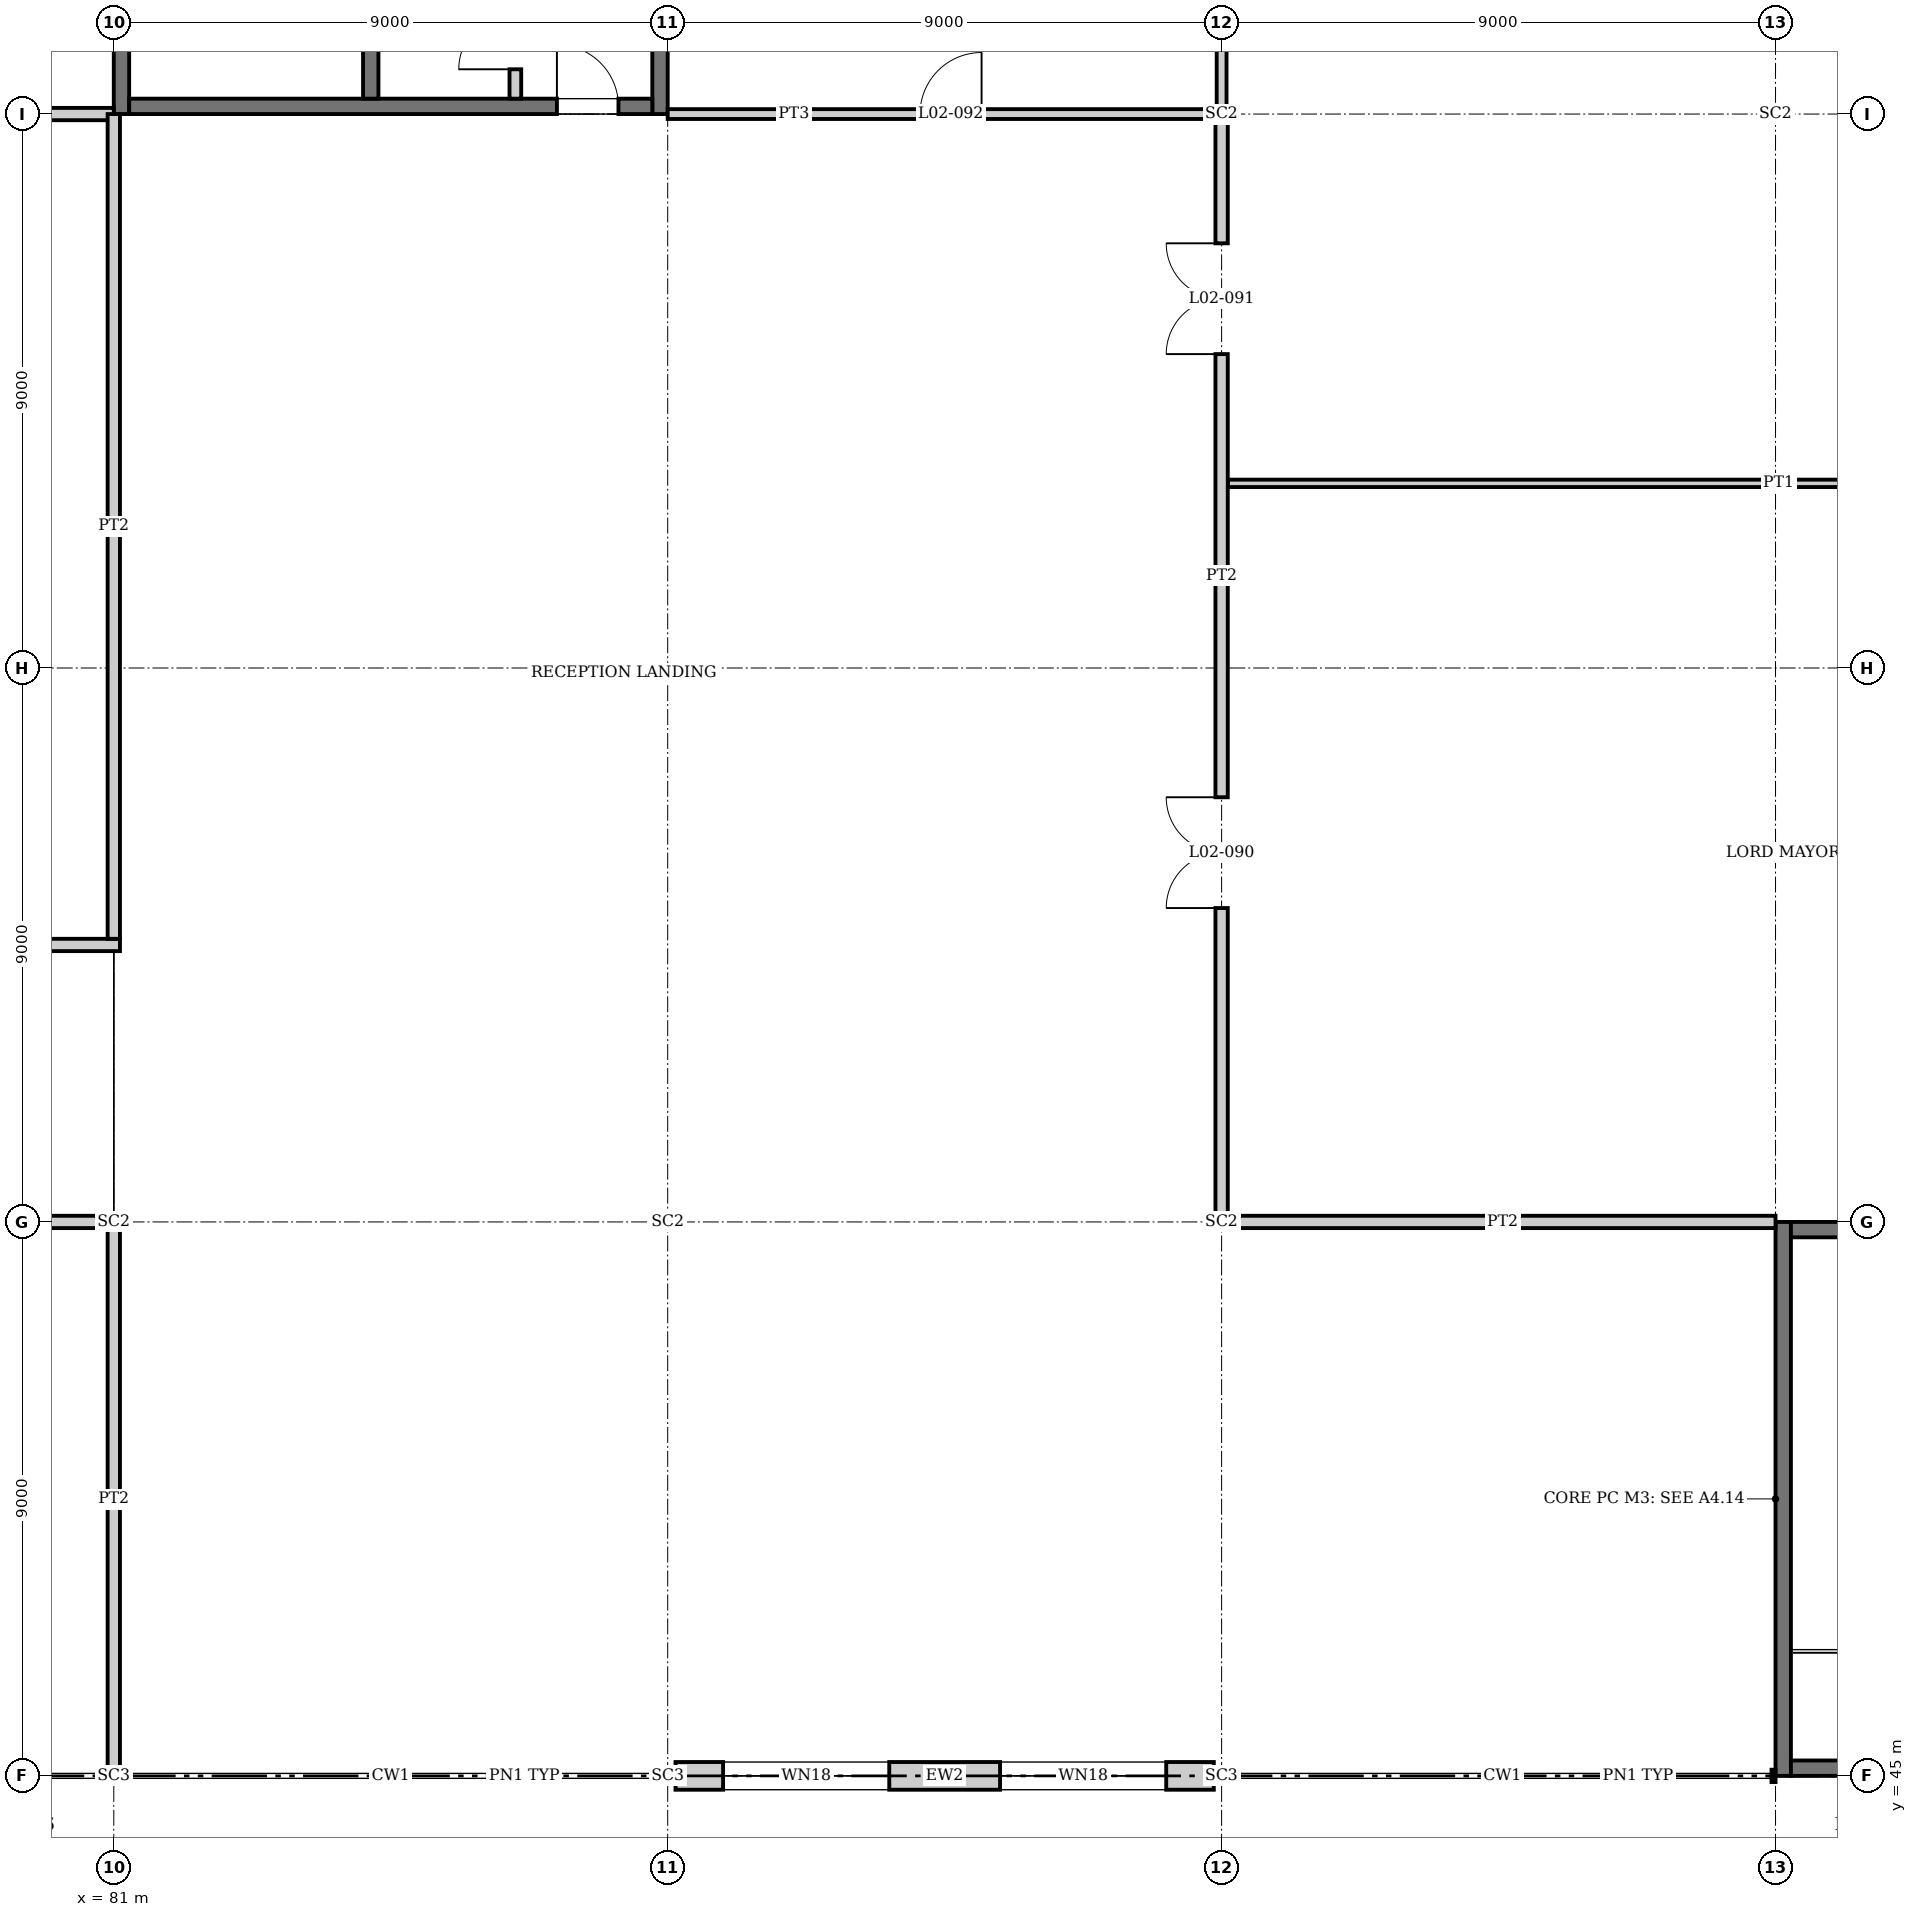
"""IFC4 building model, lengths in metres.
Left out: names, types, materials, properties, quantities, classifications, styles, units other than length and angle.
Written with IfcOpenShell. Run it as: python <this file> out.ifc"""

import sys

from ifc_helpers import new_model, si_unit, direction, frame, frame_2d, origin, origin_2d, place, context, subcontext, project, spatial, rectangle, i_section, extrude, element, fill, save


model = new_model("IFC4")
c1 = context("Model", 3, precision=1e-05, world=origin(), true_north=direction((0.0, 1.0)))
c2 = subcontext(c1, "Body", "Model", "MODEL_VIEW")
j1 = project(units=[si_unit("LENGTHUNIT", "METRE"), si_unit("PLANEANGLEUNIT", "RADIAN")], contexts=[c1])
p1 = place(None, origin())
s1 = spatial("IfcSite", under=j1, at=p1, CompositionType="ELEMENT")
p2 = place(p1, origin())
s2 = spatial("IfcBuilding", under=s1, at=p2, CompositionType="ELEMENT")
p3 = place(p2, frame((0.0, 0.0, 10.5)))
s3 = spatial("IfcBuildingStorey", under=s2, at=p3, CompositionType="ELEMENT", Elevation=10.5)
p4 = place(p3, frame((81.0, 45.0, 0.0), z_axis=(0.0, 0.0, 1.0), x_axis=(0.0, 1.0, 0.0)))
e1 = element("IfcColumn", 1, at=p4, inside=s3, PredefinedType="COLUMN", context=c2, shape_type="SweptSolid", body=[
    extrude(i_section(OverallWidth=0.254, OverallDepth=0.254, WebThickness=0.009, FlangeThickness=0.014, at=origin_2d()), origin(), (0.0, 0.0, 1.0), 4.5),
])
p5 = place(p3, frame((81.0, 54.0, 0.0), z_axis=(0.0, 0.0, 1.0), x_axis=(0.0, 1.0, 0.0)))
e2 = element("IfcColumn", 2, at=p5, inside=s3, PredefinedType="COLUMN", context=c2, shape_type="SweptSolid", body=[
    extrude(i_section(OverallWidth=0.256, OverallDepth=0.26, WebThickness=0.01, FlangeThickness=0.017, at=origin_2d()), origin(), (0.0, 0.0, 1.0), 4.5),
])
p6 = place(p3, frame((90.0, 45.0, 0.0), z_axis=(0.0, 0.0, 1.0), x_axis=(0.0, 1.0, 0.0)))
e3 = element("IfcColumn", 3, at=p6, inside=s3, PredefinedType="COLUMN", context=c2, shape_type="SweptSolid", body=[
    extrude(i_section(OverallWidth=0.254, OverallDepth=0.254, WebThickness=0.009, FlangeThickness=0.014, at=origin_2d()), origin(), (0.0, 0.0, 1.0), 4.5),
])
p7 = place(p3, frame((90.0, 54.0, 0.0), z_axis=(0.0, 0.0, 1.0), x_axis=(0.0, 1.0, 0.0)))
e4 = element("IfcColumn", 4, at=p7, inside=s3, PredefinedType="COLUMN", context=c2, shape_type="SweptSolid", body=[
    extrude(i_section(OverallWidth=0.256, OverallDepth=0.26, WebThickness=0.01, FlangeThickness=0.017, at=origin_2d()), origin(), (0.0, 0.0, 1.0), 4.5),
])
p8 = place(p3, frame((99.0, 45.0, 0.0), z_axis=(0.0, 0.0, 1.0), x_axis=(0.0, 1.0, 0.0)))
e5 = element("IfcColumn", 5, at=p8, inside=s3, PredefinedType="COLUMN", context=c2, shape_type="SweptSolid", body=[
    extrude(i_section(OverallWidth=0.254, OverallDepth=0.254, WebThickness=0.009, FlangeThickness=0.014, at=origin_2d()), origin(), (0.0, 0.0, 1.0), 4.5),
])
for number, where, z_axis, x_axis in (
    (6, (99.0, 54.0, 0.0), (0.0, 0.0, 1.0), (0.0, 1.0, 0.0)),
    (7, (99.0, 72.0, 0.0), (0.0, 0.0, 1.0), (0.0, 1.0, 0.0)),
    (8, (108.0, 72.0, 0.0), (0.0, 0.0, 1.0), (0.0, 1.0, 0.0)),
):
    element("IfcColumn", number, at=place(p3, frame(where, z_axis=z_axis, x_axis=x_axis)), inside=s3, PredefinedType="COLUMN", context=c2, shape_type="SweptSolid", body=[
        extrude(i_section(OverallWidth=0.256, OverallDepth=0.26, WebThickness=0.01, FlangeThickness=0.017, at=origin_2d()), origin(), (0.0, 0.0, 1.0), 4.5),
    ])
p9 = place(p3, frame((108.125, 45.0, 0.0), z_axis=(0.0, 0.0, 1.0), x_axis=(0.0, 1.0, 0.0)))
e9 = element("IfcWall", 9, at=p9, inside=s3, PredefinedType="SHEAR", context=c2, shape_type="SweptSolid", body=[
    extrude(rectangle(XDim=9.0, YDim=0.25, at=frame_2d((4.5, 0.0))), origin(), (0.0, 0.0, 1.0), 4.35),
])
for number, where, z_axis, x_axis in (
    (10, (108.25, 45.125, 0.0), (0.0, 0.0, 1.0), (1.0, 0.0, 0.0)),
    (11, (108.25, 53.875, 0.0), (0.0, 0.0, 1.0), (1.0, 0.0, 0.0)),
):
    element("IfcWall", number, at=place(p3, frame(where, z_axis=z_axis, x_axis=x_axis)), inside=s3, PredefinedType="SHEAR", context=c2, shape_type="SweptSolid", body=[
        extrude(rectangle(XDim=8.5, YDim=0.25, at=frame_2d((4.25, 0.0))), origin(), (0.0, 0.0, 1.0), 4.35),
    ])
for number, where, z_axis, x_axis in (
    (12, (81.125, 72.0, 0.0), (0.0, 0.0, 1.0), (0.0, 1.0, 0.0)),
    (13, (89.875, 72.0, 0.0), (0.0, 0.0, 1.0), (0.0, 1.0, 0.0)),
):
    element("IfcWall", number, at=place(p3, frame(where, z_axis=z_axis, x_axis=x_axis)), inside=s3, PredefinedType="SHEAR", context=c2, shape_type="SweptSolid", body=[
        extrude(rectangle(XDim=9.0, YDim=0.25, at=frame_2d((4.5, 0.0))), origin(), (0.0, 0.0, 1.0), 4.35),
    ])
p10 = place(p3, frame((81.25, 72.125, 0.0), z_axis=(0.0, 0.0, 1.0), x_axis=(1.0, 0.0, 0.0)))
e14 = element("IfcWall", 14, at=p10, inside=s3, PredefinedType="SHEAR", context=c2, shape_type="SweptSolid", body=[
    extrude(rectangle(XDim=8.5, YDim=0.25, at=frame_2d((4.25, 0.0))), origin(), (0.0, 0.0, 1.0), 4.35),
])
p11 = place(p10, frame((6.95, 0.0, 0.0)))
e15 = element("IfcOpeningElement", 15, at=p11, cuts=e14, PredefinedType="OPENING", context=c2, shape_type="SweptSolid", body=[
    extrude(rectangle(XDim=1.0, YDim=2.1, at=frame_2d((0.5, 1.05))), frame((0.0, 0.135, 0.0), z_axis=(0.0, -1.0, 0.0), x_axis=(1.0, 0.0, 0.0)), (0.0, 0.0, 1.0), 0.27),
])
p12 = place(p3, frame((90.127, 45.0, 0.0), z_axis=(0.0, 0.0, 1.0), x_axis=(1.0, 0.0, 0.0)))
e16 = element("IfcWall", 16, at=p12, inside=s3, PredefinedType="SOLIDWALL", context=c2, shape_type="SweptSolid", body=[
    extrude(rectangle(XDim=8.746, YDim=0.45, at=frame_2d((4.373, 0.0))), origin(), (0.0, 0.0, 1.0), 3.991),
])
p13 = place(p12, frame((0.773, 0.0, 0.6)))
e17 = element("IfcOpeningElement", 17, at=p13, cuts=e16, PredefinedType="OPENING", context=c2, shape_type="SweptSolid", body=[
    extrude(rectangle(XDim=2.7, YDim=2.7, at=frame_2d((1.35, 1.35))), frame((0.0, 0.235, 0.0), z_axis=(0.0, -1.0, 0.0), x_axis=(1.0, 0.0, 0.0)), (0.0, 0.0, 1.0), 0.47),
])
p14 = place(p12, frame((5.273, 0.0, 0.6)))
e18 = element("IfcOpeningElement", 18, at=p14, cuts=e16, PredefinedType="OPENING", context=c2, shape_type="SweptSolid", body=[
    extrude(rectangle(XDim=2.7, YDim=2.7, at=frame_2d((1.35, 1.35))), frame((0.0, 0.235, 0.0), z_axis=(0.0, -1.0, 0.0), x_axis=(1.0, 0.0, 0.0)), (0.0, 0.0, 1.0), 0.47),
])
p15 = place(p3, frame((85.175, 80.4, 0.0), z_axis=(0.0, 0.0, 1.0), x_axis=(0.0, -1.0, 0.0)))
e19 = element("IfcWall", 19, at=p15, inside=s3, PredefinedType="SOLIDWALL", context=c2, shape_type="SweptSolid", body=[
    extrude(rectangle(XDim=8.15, YDim=0.25, at=frame_2d((4.075, 0.0))), origin(), (0.0, 0.0, 1.0), 4.35),
])
p16 = place(p15, frame((0.4, 0.0, 0.0)))
e20 = element("IfcOpeningElement", 20, at=p16, cuts=e19, PredefinedType="OPENING", context=c2, shape_type="SweptSolid", body=[
    extrude(rectangle(XDim=1.0, YDim=2.1, at=frame_2d((0.5, 1.05))), frame((0.0, 0.135, 0.0), z_axis=(0.0, -1.0, 0.0), x_axis=(1.0, 0.0, 0.0)), (0.0, 0.0, 1.0), 0.27),
])
p17 = place(p3, frame((72.13, 54.0, 0.0), z_axis=(0.0, 0.0, 1.0), x_axis=(1.0, 0.0, 0.0)))
e21 = element("IfcWall", 21, at=p17, inside=s3, PredefinedType="PARTITIONING", context=c2, shape_type="SweptSolid", body=[
    extrude(rectangle(XDim=8.74, YDim=0.2, at=frame_2d((4.37, 0.0))), origin(), (0.0, 0.0, 1.0), 3.738),
])
p18 = place(p17, frame((3.97, 0.0, 0.0)))
e22 = element("IfcOpeningElement", 22, at=p18, cuts=e21, PredefinedType="OPENING", context=c2, shape_type="SweptSolid", body=[
    extrude(rectangle(XDim=1.0, YDim=2.1, at=frame_2d((0.5, 1.05))), frame((0.0, 0.11, 0.0), z_axis=(0.0, -1.0, 0.0), x_axis=(1.0, 0.0, 0.0)), (0.0, 0.0, 1.0), 0.22),
])
p19 = place(p3, frame((99.13, 54.0, 0.0), z_axis=(0.0, 0.0, 1.0), x_axis=(1.0, 0.0, 0.0)))
e23 = element("IfcWall", 23, at=p19, inside=s3, PredefinedType="PARTITIONING", context=c2, shape_type="SweptSolid", body=[
    extrude(rectangle(XDim=8.87, YDim=0.2, at=frame_2d((4.435, 0.0))), origin(), (0.0, 0.0, 1.0), 3.738),
])
p20 = place(p3, frame((0.15, 58.5, 0.0), z_axis=(0.0, 0.0, 1.0), x_axis=(1.0, 0.0, 0.0)))
e24 = element("IfcWall", 24, at=p20, inside=s3, PredefinedType="PARTITIONING", context=c2, shape_type="SweptSolid", body=[
    extrude(rectangle(XDim=80.95, YDim=0.2, at=frame_2d((40.475, 0.0))), origin(), (0.0, 0.0, 1.0), 3.65),
])
p21 = place(p20, frame((16.95, 0.0, 0.0)))
e25 = element("IfcOpeningElement", 25, at=p21, cuts=e24, PredefinedType="OPENING", context=c2, shape_type="SweptSolid", body=[
    extrude(rectangle(XDim=1.8, YDim=2.1, at=frame_2d((0.9, 1.05))), frame((0.0, 0.11, 0.0), z_axis=(0.0, -1.0, 0.0), x_axis=(1.0, 0.0, 0.0)), (0.0, 0.0, 1.0), 0.22),
])
p22 = place(p20, frame((61.95, 0.0, 0.0)))
e26 = element("IfcOpeningElement", 26, at=p22, cuts=e24, PredefinedType="OPENING", context=c2, shape_type="SweptSolid", body=[
    extrude(rectangle(XDim=1.8, YDim=2.1, at=frame_2d((0.9, 1.05))), frame((0.0, 0.11, 0.0), z_axis=(0.0, -1.0, 0.0), x_axis=(1.0, 0.0, 0.0)), (0.0, 0.0, 1.0), 0.22),
])
p23 = place(p3, frame((99.1, 66.0, 0.0), z_axis=(0.0, 0.0, 1.0), x_axis=(1.0, 0.0, 0.0)))
e27 = element("IfcWall", 27, at=p23, inside=s3, PredefinedType="PARTITIONING", context=c2, shape_type="SweptSolid", body=[
    extrude(rectangle(XDim=17.9, YDim=0.12, at=frame_2d((8.95, 0.0))), origin(), (0.0, 0.0, 1.0), 3.65),
])
p24 = place(p3, frame((72.13, 72.0, 0.0), z_axis=(0.0, 0.0, 1.0), x_axis=(1.0, 0.0, 0.0)))
e28 = element("IfcWall", 28, at=p24, inside=s3, PredefinedType="PARTITIONING", context=c2, shape_type="SweptSolid", body=[
    extrude(rectangle(XDim=8.87, YDim=0.2, at=frame_2d((4.435, 0.0))), origin(), (0.0, 0.0, 1.0), 3.738),
])
p25 = place(p24, frame((3.97, 0.0, 0.0)))
e29 = element("IfcOpeningElement", 29, at=p25, cuts=e28, PredefinedType="OPENING", context=c2, shape_type="SweptSolid", body=[
    extrude(rectangle(XDim=1.0, YDim=2.1, at=frame_2d((0.5, 1.05))), frame((0.0, 0.11, 0.0), z_axis=(0.0, -1.0, 0.0), x_axis=(1.0, 0.0, 0.0)), (0.0, 0.0, 1.0), 0.22),
])
p26 = place(p3, frame((90.0, 72.0, 0.0), z_axis=(0.0, 0.0, 1.0), x_axis=(1.0, 0.0, 0.0)))
e30 = element("IfcWall", 30, at=p26, inside=s3, PredefinedType="PARTITIONING", context=c2, shape_type="SweptSolid", body=[
    extrude(rectangle(XDim=8.87, YDim=0.16, at=frame_2d((4.435, 0.0))), origin(), (0.0, 0.0, 1.0), 3.738),
])
p27 = place(p26, frame((4.1, 0.0, 0.0)))
e31 = element("IfcOpeningElement", 31, at=p27, cuts=e30, PredefinedType="OPENING", context=c2, shape_type="SweptSolid", body=[
    extrude(rectangle(XDim=1.0, YDim=2.1, at=frame_2d((0.5, 1.05))), frame((0.0, 0.09, 0.0), z_axis=(0.0, -1.0, 0.0), x_axis=(1.0, 0.0, 0.0)), (0.0, 0.0, 1.0), 0.18),
])
p28 = place(p3, frame((81.0, 45.127, 0.0), z_axis=(0.0, 0.0, 1.0), x_axis=(0.0, 1.0, 0.0)))
e32 = element("IfcWall", 32, at=p28, inside=s3, PredefinedType="PARTITIONING", context=c2, shape_type="SweptSolid", body=[
    extrude(rectangle(XDim=8.743, YDim=0.2, at=frame_2d((4.372, 0.0))), origin(), (0.0, 0.0, 1.0), 3.998),
])
p29 = place(p3, frame((81.0, 58.6, 0.0), z_axis=(0.0, 0.0, 1.0), x_axis=(0.0, 1.0, 0.0)))
e33 = element("IfcWall", 33, at=p29, inside=s3, PredefinedType="PARTITIONING", context=c2, shape_type="SweptSolid", body=[
    extrude(rectangle(XDim=13.4, YDim=0.2, at=frame_2d((6.7, 0.0))), origin(), (0.0, 0.0, 1.0), 3.65),
])
p30 = place(p3, frame((87.525, 72.25, 0.0), z_axis=(0.0, 0.0, 1.0), x_axis=(0.0, 1.0, 0.0)))
e34 = element("IfcWall", 34, at=p30, inside=s3, PredefinedType="PARTITIONING", context=c2, shape_type="SweptSolid", body=[
    extrude(rectangle(XDim=2.0, YDim=0.19, at=frame_2d((1.0, 0.0))), origin(), (0.0, 0.0, 1.0), 4.35),
])
p31 = place(p30, frame((0.478, 0.0, 0.0)))
e35 = element("IfcOpeningElement", 35, at=p31, cuts=e34, PredefinedType="OPENING", context=c2, shape_type="SweptSolid", body=[
    extrude(rectangle(XDim=0.92, YDim=2.1, at=frame_2d((0.46, 1.05))), frame((0.0, 0.105, 0.0), z_axis=(0.0, -1.0, 0.0), x_axis=(1.0, 0.0, 0.0)), (0.0, 0.0, 1.0), 0.21),
])
p32 = place(p3, frame((99.0, 54.13, 0.0), z_axis=(0.0, 0.0, 1.0), x_axis=(0.0, 1.0, 0.0)))
e36 = element("IfcWall", 36, at=p32, inside=s3, PredefinedType="PARTITIONING", context=c2, shape_type="SweptSolid", body=[
    extrude(rectangle(XDim=17.74, YDim=0.2, at=frame_2d((8.87, 0.0))), origin(), (0.0, 0.0, 1.0), 3.65),
])
p33 = place(p32, frame((4.97, 0.0, 0.0)))
e37 = element("IfcOpeningElement", 37, at=p33, cuts=e36, PredefinedType="OPENING", context=c2, shape_type="SweptSolid", body=[
    extrude(rectangle(XDim=1.8, YDim=2.1, at=frame_2d((0.9, 1.05))), frame((0.0, 0.11, 0.0), z_axis=(0.0, -1.0, 0.0), x_axis=(1.0, 0.0, 0.0)), (0.0, 0.0, 1.0), 0.22),
])
p34 = place(p32, frame((13.97, 0.0, 0.0)))
e38 = element("IfcOpeningElement", 38, at=p34, cuts=e36, PredefinedType="OPENING", context=c2, shape_type="SweptSolid", body=[
    extrude(rectangle(XDim=1.8, YDim=2.1, at=frame_2d((0.9, 1.05))), frame((0.0, 0.11, 0.0), z_axis=(0.0, -1.0, 0.0), x_axis=(1.0, 0.0, 0.0)), (0.0, 0.0, 1.0), 0.22),
])
p35 = place(p3, frame((99.0, 72.13, 0.0), z_axis=(0.0, 0.0, 1.0), x_axis=(0.0, 1.0, 0.0)))
e39 = element("IfcWall", 39, at=p35, inside=s3, PredefinedType="PARTITIONING", context=c2, shape_type="SweptSolid", body=[
    extrude(rectangle(XDim=2.79, YDim=0.16, at=frame_2d((1.395, 0.0))), origin(), (0.0, 0.0, 1.0), 4.043),
])
p36 = place(p13, origin())
e40 = element("IfcWindow", 40, at=p36, inside=s3, PartitioningType="SINGLE_PANEL", PredefinedType="WINDOW", context=c2, shape_type="SweptSolid", body=[
    extrude(rectangle(XDim=2.7, YDim=2.7, at=frame_2d((1.35, 1.35))), frame((0.0, 0.03, 0.0), z_axis=(0.0, -1.0, 0.0), x_axis=(1.0, 0.0, 0.0)), (0.0, 0.0, 1.0), 0.06),
])
fill(e17, e40)
p37 = place(p14, origin())
e41 = element("IfcWindow", 41, at=p37, inside=s3, PartitioningType="SINGLE_PANEL", PredefinedType="WINDOW", context=c2, shape_type="SweptSolid", body=[
    extrude(rectangle(XDim=2.7, YDim=2.7, at=frame_2d((1.35, 1.35))), frame((0.0, 0.03, 0.0), z_axis=(0.0, -1.0, 0.0), x_axis=(1.0, 0.0, 0.0)), (0.0, 0.0, 1.0), 0.06),
])
fill(e18, e41)
p38 = place(p11, origin())
e42 = element("IfcDoor", 42, at=p38, inside=s3, OperationType="SINGLE_SWING_LEFT", PredefinedType="DOOR", context=c2, shape_type="SweptSolid", body=[
    extrude(rectangle(XDim=1.0, YDim=2.1, at=frame_2d((0.5, 1.05))), frame((0.0, 0.025, 0.0), z_axis=(0.0, -1.0, 0.0), x_axis=(1.0, 0.0, 0.0)), (0.0, 0.0, 1.0), 0.05),
])
fill(e15, e42)
p39 = place(p31, origin())
e43 = element("IfcDoor", 43, at=p39, inside=s3, OperationType="SINGLE_SWING_LEFT", PredefinedType="DOOR", context=c2, shape_type="SweptSolid", body=[
    extrude(rectangle(XDim=0.92, YDim=2.1, at=frame_2d((0.46, 1.05))), frame((0.0, 0.025, 0.0), z_axis=(0.0, -1.0, 0.0), x_axis=(1.0, 0.0, 0.0)), (0.0, 0.0, 1.0), 0.05),
])
fill(e35, e43)
p40 = place(p33, origin())
e44 = element("IfcDoor", 44, at=p40, inside=s3, OperationType="DOUBLE_DOOR_SINGLE_SWING", PredefinedType="DOOR", context=c2, shape_type="SweptSolid", body=[
    extrude(rectangle(XDim=1.8, YDim=2.1, at=frame_2d((0.9, 1.05))), frame((0.0, 0.025, 0.0), z_axis=(0.0, -1.0, 0.0), x_axis=(1.0, 0.0, 0.0)), (0.0, 0.0, 1.0), 0.05),
])
fill(e37, e44)
p41 = place(p34, origin())
e45 = element("IfcDoor", 45, at=p41, inside=s3, OperationType="DOUBLE_DOOR_SINGLE_SWING", PredefinedType="DOOR", context=c2, shape_type="SweptSolid", body=[
    extrude(rectangle(XDim=1.8, YDim=2.1, at=frame_2d((0.9, 1.05))), frame((0.0, 0.025, 0.0), z_axis=(0.0, -1.0, 0.0), x_axis=(1.0, 0.0, 0.0)), (0.0, 0.0, 1.0), 0.05),
])
fill(e38, e45)
p42 = place(p27, origin())
e46 = element("IfcDoor", 46, at=p42, inside=s3, OperationType="SINGLE_SWING_RIGHT", PredefinedType="DOOR", context=c2, shape_type="SweptSolid", body=[
    extrude(rectangle(XDim=1.0, YDim=2.1, at=frame_2d((0.5, 1.05))), frame((0.0, 0.025, 0.0), z_axis=(0.0, -1.0, 0.0), x_axis=(1.0, 0.0, 0.0)), (0.0, 0.0, 1.0), 0.05),
])
fill(e31, e46)
save(model, sys.argv[1])
